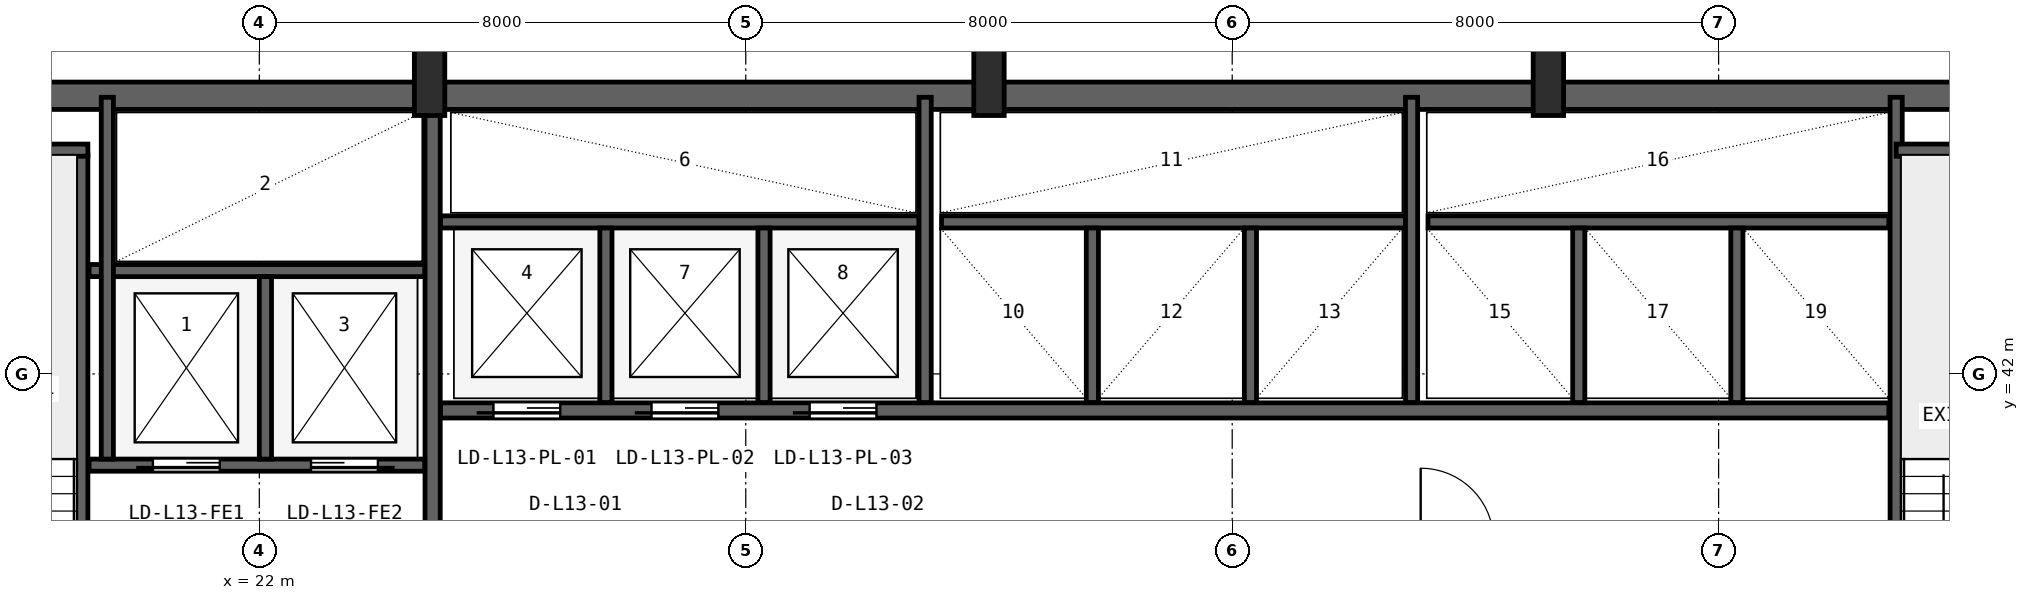
"""IFC4 building model, lengths in metres.
Left out: names, types, materials, properties, quantities, classifications, styles, units other than length and angle.
Written with IfcOpenShell. Run it as: python <this file> out.ifc"""

import sys

from ifc_helpers import new_model, si_unit, direction, frame, frame_2d, origin, origin_2d, place, context, subcontext, project, spatial, rectangle, i_section, extrude, source, transform, mapped, element, fill, save


model = new_model("IFC4")
c1 = context("Model", 3, precision=1e-05, world=origin(), true_north=direction((0.0, 1.0)))
c2 = subcontext(c1, "Body", "Model", "MODEL_VIEW")
j1 = project(units=[si_unit("LENGTHUNIT", "METRE"), si_unit("PLANEANGLEUNIT", "RADIAN")], contexts=[c1])
p1 = place(None, origin())
s1 = spatial("IfcSite", under=j1, at=p1, CompositionType="ELEMENT")
p2 = place(p1, origin())
s2 = spatial("IfcBuilding", under=s1, at=p2, CompositionType="ELEMENT")
p3 = place(p2, frame((0.0, 0.0, 58.8)))
s3 = spatial("IfcBuildingStorey", under=s2, at=p3, CompositionType="ELEMENT", Elevation=58.8)
p4 = place(p3, frame((15.6, 46.575, 0.0), z_axis=(0.0, 0.0, 1.0), x_axis=(1.0, 0.0, 0.0)))
e1 = element("IfcWall", 1, at=p4, inside=s3, PredefinedType="SHEAR", context=c2, shape_type="SweptSolid", body=[
    extrude(rectangle(XDim=36.8, YDim=0.45, at=frame_2d((18.4, 0.0))), origin(), (0.0, 0.0, 1.0), 3.65),
])
m1 = source(origin(), c2, "Body", "SweptSolid", [
    extrude(i_section(OverallWidth=0.5, OverallDepth=1.1, WebThickness=0.018, FlangeThickness=0.032, FilletRadius=0.018, at=origin_2d()), origin(), (0.0, 0.0, 1.0), 3.9),
])
for number, where, z_axis, x_axis in (
    (2, (24.8, 46.8, 0.0), (0.0, 0.0, 1.0), (1.0, 0.0, 0.0)),
    (3, (34.0, 46.8, 0.0), (0.0, 0.0, 1.0), (1.0, 0.0, 0.0)),
    (4, (43.2, 46.8, 0.0), (0.0, 0.0, 1.0), (1.0, 0.0, 0.0)),
):
    element("IfcColumn", number, at=place(p3, frame(where, z_axis=z_axis, x_axis=x_axis)), inside=s3, PredefinedType="COLUMN", context=c2, shape_type="MappedRepresentation", body=[
        mapped(m1, transform((0.0, 0.0, 0.0), x_axis=(1.0, 0.0, 0.0), y_axis=(0.0, 1.0, 0.0), z_axis=(0.0, 0.0, 1.0), scale=1.0)),
    ])
p5 = place(p3, frame((19.08, 35.95, 0.0), z_axis=(0.0, 0.0, 1.0), x_axis=(0.0, 1.0, 0.0)))
e5 = element("IfcWall", 5, at=p5, inside=s3, PredefinedType="SHEAR", context=c2, shape_type="SweptSolid", body=[
    extrude(rectangle(XDim=9.65, YDim=0.2, at=frame_2d((4.825, 0.0))), origin(), (0.0, 0.0, 1.0), 3.65),
])
p6 = place(p5, frame((0.25, 0.0, 0.0)))
e6 = element("IfcOpeningElement", 6, at=p6, cuts=e5, PredefinedType="OPENING", context=c2, shape_type="SweptSolid", body=[
    extrude(rectangle(XDim=0.95, YDim=2.1, at=frame_2d((0.475, 1.05))), frame((0.0, 0.11, 0.0), z_axis=(0.0, -1.0, 0.0), x_axis=(1.0, 0.0, 0.0)), (0.0, 0.0, 1.0), 0.22),
])
p7 = place(p3, frame((15.95, 45.68, 0.0), z_axis=(0.0, 0.0, 1.0), x_axis=(1.0, 0.0, 0.0)))
e7 = element("IfcWall", 7, at=p7, inside=s3, PredefinedType="SHEAR", context=c2, shape_type="SweptSolid", body=[
    extrude(rectangle(XDim=3.23, YDim=0.2, at=frame_2d((1.615, 0.0))), origin(), (0.0, 0.0, 1.0), 3.65),
])
p8 = place(p3, frame((24.85, 36.05, 0.0), z_axis=(0.0, 0.0, 1.0), x_axis=(0.0, 1.0, 0.0)))
e8 = element("IfcWall", 8, at=p8, inside=s3, PredefinedType="SHEAR", context=c2, shape_type="SweptSolid", body=[
    extrude(rectangle(XDim=10.45, YDim=0.25, at=frame_2d((5.225, 0.0))), origin(), (0.0, 0.0, 1.0), 3.65),
])
p9 = place(p3, frame((19.2, 40.5, 0.0), z_axis=(0.0, 0.0, 1.0), x_axis=(1.0, 0.0, 0.0)))
e9 = element("IfcWall", 9, at=p9, inside=s3, PredefinedType="SHEAR", context=c2, shape_type="SweptSolid", body=[
    extrude(rectangle(XDim=5.52, YDim=0.2, at=frame_2d((2.76, 0.0))), origin(), (0.0, 0.0, 1.0), 3.65),
])
p10 = place(p9, frame((1.05, 0.0, 0.0)))
e10 = element("IfcOpeningElement", 10, at=p10, cuts=e9, PredefinedType="OPENING", context=c2, shape_type="SweptSolid", body=[
    extrude(rectangle(XDim=1.1, YDim=2.18, at=frame_2d((0.55, 1.09))), frame((0.0, 0.11, 0.0), z_axis=(0.0, -1.0, 0.0), x_axis=(1.0, 0.0, 0.0)), (0.0, 0.0, 1.0), 0.22),
])
p11 = place(p9, frame((3.65, 0.0, 0.0)))
e11 = element("IfcOpeningElement", 11, at=p11, cuts=e9, PredefinedType="OPENING", context=c2, shape_type="SweptSolid", body=[
    extrude(rectangle(XDim=1.1, YDim=2.18, at=frame_2d((0.55, 1.09))), frame((0.0, 0.11, 0.0), z_axis=(0.0, -1.0, 0.0), x_axis=(1.0, 0.0, 0.0)), (0.0, 0.0, 1.0), 0.22),
])
p12 = place(p3, frame((19.2, 43.7, 0.0), z_axis=(0.0, 0.0, 1.0), x_axis=(1.0, 0.0, 0.0)))
e12 = element("IfcWall", 12, at=p12, inside=s3, PredefinedType="SHEAR", context=c2, shape_type="SweptSolid", body=[
    extrude(rectangle(XDim=5.52, YDim=0.2, at=frame_2d((2.76, 0.0))), origin(), (0.0, 0.0, 1.0), 3.65),
])
p13 = place(p3, frame((22.1, 40.6, 0.0), z_axis=(0.0, 0.0, 1.0), x_axis=(0.0, 1.0, 0.0)))
e13 = element("IfcWall", 13, at=p13, inside=s3, PredefinedType="SHEAR", context=c2, shape_type="SweptSolid", body=[
    extrude(rectangle(XDim=3.0, YDim=0.2, at=frame_2d((1.5, 0.0))), origin(), (0.0, 0.0, 1.0), 3.65),
])
p14 = place(p3, frame((19.5, 40.6, 0.0), z_axis=(0.0, 0.0, 1.0), x_axis=(0.0, 1.0, 0.0)))
e14 = element("IfcWall", 14, at=p14, inside=s3, PredefinedType="SHEAR", context=c2, shape_type="SweptSolid", body=[
    extrude(rectangle(XDim=5.95, YDim=0.2, at=frame_2d((2.975, 0.0))), origin(), (0.0, 0.0, 1.0), 3.65),
])
p15 = place(p3, frame((48.92, 36.05, 0.0), z_axis=(0.0, 0.0, 1.0), x_axis=(0.0, 1.0, 0.0)))
e15 = element("IfcWall", 15, at=p15, inside=s3, PredefinedType="SHEAR", context=c2, shape_type="SweptSolid", body=[
    extrude(rectangle(XDim=10.5, YDim=0.2, at=frame_2d((5.25, 0.0))), origin(), (0.0, 0.0, 1.0), 3.65),
])
p16 = place(p3, frame((48.92, 45.68, 0.0), z_axis=(0.0, 0.0, 1.0), x_axis=(1.0, 0.0, 0.0)))
e16 = element("IfcWall", 16, at=p16, inside=s3, PredefinedType="SHEAR", context=c2, shape_type="SweptSolid", body=[
    extrude(rectangle(XDim=3.18, YDim=0.2, at=frame_2d((1.59, 0.0))), origin(), (0.0, 0.0, 1.0), 3.65),
])
p17 = place(p3, frame((24.98, 41.4, 0.0), z_axis=(0.0, 0.0, 1.0), x_axis=(1.0, 0.0, 0.0)))
e17 = element("IfcWall", 17, at=p17, inside=s3, PredefinedType="SHEAR", context=c2, shape_type="SweptSolid", body=[
    extrude(rectangle(XDim=23.82, YDim=0.25, at=frame_2d((11.91, 0.0))), origin(), (0.0, 0.0, 1.0), 3.65),
])
p18 = place(p17, frame((0.87, 0.0, 0.0)))
e18 = element("IfcOpeningElement", 18, at=p18, cuts=e17, PredefinedType="OPENING", context=c2, shape_type="SweptSolid", body=[
    extrude(rectangle(XDim=1.1, YDim=2.18, at=frame_2d((0.55, 1.09))), frame((0.0, 0.135, 0.0), z_axis=(0.0, -1.0, 0.0), x_axis=(1.0, 0.0, 0.0)), (0.0, 0.0, 1.0), 0.27),
])
p19 = place(p17, frame((3.47, 0.0, 0.0)))
e19 = element("IfcOpeningElement", 19, at=p19, cuts=e17, PredefinedType="OPENING", context=c2, shape_type="SweptSolid", body=[
    extrude(rectangle(XDim=1.1, YDim=2.18, at=frame_2d((0.55, 1.09))), frame((0.0, 0.135, 0.0), z_axis=(0.0, -1.0, 0.0), x_axis=(1.0, 0.0, 0.0)), (0.0, 0.0, 1.0), 0.27),
])
p20 = place(p17, frame((6.07, 0.0, 0.0)))
e20 = element("IfcOpeningElement", 20, at=p20, cuts=e17, PredefinedType="OPENING", context=c2, shape_type="SweptSolid", body=[
    extrude(rectangle(XDim=1.1, YDim=2.18, at=frame_2d((0.55, 1.09))), frame((0.0, 0.135, 0.0), z_axis=(0.0, -1.0, 0.0), x_axis=(1.0, 0.0, 0.0)), (0.0, 0.0, 1.0), 0.27),
])
p21 = place(p3, frame((24.98, 44.5, 0.0), z_axis=(0.0, 0.0, 1.0), x_axis=(1.0, 0.0, 0.0)))
e21 = element("IfcWall", 21, at=p21, inside=s3, PredefinedType="SHEAR", context=c2, shape_type="SweptSolid", body=[
    extrude(rectangle(XDim=7.87, YDim=0.2, at=frame_2d((3.935, 0.0))), origin(), (0.0, 0.0, 1.0), 3.65),
])
for number, where, z_axis, x_axis in (
    (22, (27.7, 41.53, 0.0), (0.0, 0.0, 1.0), (0.0, 1.0, 0.0)),
    (23, (30.3, 41.53, 0.0), (0.0, 0.0, 1.0), (0.0, 1.0, 0.0)),
):
    element("IfcWall", number, at=place(p3, frame(where, z_axis=z_axis, x_axis=x_axis)), inside=s3, PredefinedType="SHEAR", context=c2, shape_type="SweptSolid", body=[
        extrude(rectangle(XDim=2.87, YDim=0.2, at=frame_2d((1.435, 0.0))), origin(), (0.0, 0.0, 1.0), 3.65),
    ])
p22 = place(p3, frame((32.95, 41.53, 0.0), z_axis=(0.0, 0.0, 1.0), x_axis=(0.0, 1.0, 0.0)))
e24 = element("IfcWall", 24, at=p22, inside=s3, PredefinedType="SHEAR", context=c2, shape_type="SweptSolid", body=[
    extrude(rectangle(XDim=5.02, YDim=0.2, at=frame_2d((2.51, 0.0))), origin(), (0.0, 0.0, 1.0), 3.65),
])
p23 = place(p3, frame((33.22, 44.5, 0.0), z_axis=(0.0, 0.0, 1.0), x_axis=(1.0, 0.0, 0.0)))
e25 = element("IfcWall", 25, at=p23, inside=s3, PredefinedType="SHEAR", context=c2, shape_type="SweptSolid", body=[
    extrude(rectangle(XDim=7.63, YDim=0.2, at=frame_2d((3.815, 0.0))), origin(), (0.0, 0.0, 1.0), 3.65),
])
for number, where, z_axis, x_axis in (
    (26, (35.7, 41.53, 0.0), (0.0, 0.0, 1.0), (0.0, 1.0, 0.0)),
    (27, (38.3, 41.53, 0.0), (0.0, 0.0, 1.0), (0.0, 1.0, 0.0)),
):
    element("IfcWall", number, at=place(p3, frame(where, z_axis=z_axis, x_axis=x_axis)), inside=s3, PredefinedType="SHEAR", context=c2, shape_type="SweptSolid", body=[
        extrude(rectangle(XDim=2.87, YDim=0.2, at=frame_2d((1.435, 0.0))), origin(), (0.0, 0.0, 1.0), 3.65),
    ])
p24 = place(p3, frame((40.95, 41.53, 0.0), z_axis=(0.0, 0.0, 1.0), x_axis=(0.0, 1.0, 0.0)))
e28 = element("IfcWall", 28, at=p24, inside=s3, PredefinedType="SHEAR", context=c2, shape_type="SweptSolid", body=[
    extrude(rectangle(XDim=5.02, YDim=0.2, at=frame_2d((2.51, 0.0))), origin(), (0.0, 0.0, 1.0), 3.65),
])
p25 = place(p3, frame((41.22, 44.5, 0.0), z_axis=(0.0, 0.0, 1.0), x_axis=(1.0, 0.0, 0.0)))
e29 = element("IfcWall", 29, at=p25, inside=s3, PredefinedType="SHEAR", context=c2, shape_type="SweptSolid", body=[
    extrude(rectangle(XDim=7.58, YDim=0.2, at=frame_2d((3.79, 0.0))), origin(), (0.0, 0.0, 1.0), 3.65),
])
for number, where, z_axis, x_axis in (
    (30, (43.7, 41.53, 0.0), (0.0, 0.0, 1.0), (0.0, 1.0, 0.0)),
    (31, (46.3, 41.53, 0.0), (0.0, 0.0, 1.0), (0.0, 1.0, 0.0)),
):
    element("IfcWall", number, at=place(p3, frame(where, z_axis=z_axis, x_axis=x_axis)), inside=s3, PredefinedType="SHEAR", context=c2, shape_type="SweptSolid", body=[
        extrude(rectangle(XDim=2.87, YDim=0.2, at=frame_2d((1.435, 0.0))), origin(), (0.0, 0.0, 1.0), 3.65),
    ])
m2 = source(origin(), c2, "Body", "SweptSolid", [
    extrude(rectangle(XDim=1.1, YDim=2.18, at=frame_2d((0.55, 1.09))), frame((0.0, 0.025, 0.0), z_axis=(0.0, -1.0, 0.0), x_axis=(1.0, 0.0, 0.0)), (0.0, 0.0, 1.0), 0.05),
])
p26 = place(p10, frame((1.1, 0.0, 0.0), z_axis=(0.0, 0.0, 1.0), x_axis=(-1.0, 0.0, 0.0)))
e32 = element("IfcDoor", 32, at=p26, inside=s3, OperationType="SLIDING_TO_LEFT", PredefinedType="DOOR", context=c2, shape_type="MappedRepresentation", body=[
    mapped(m2, transform((0.0, 0.0, 0.0), x_axis=(1.0, 0.0, 0.0), y_axis=(0.0, 1.0, 0.0), z_axis=(0.0, 0.0, 1.0), scale=1.0)),
])
fill(e10, e32)
p27 = place(p11, frame((1.1, 0.0, 0.0), z_axis=(0.0, 0.0, 1.0), x_axis=(-1.0, 0.0, 0.0)))
e33 = element("IfcDoor", 33, at=p27, inside=s3, OperationType="SLIDING_TO_RIGHT", PredefinedType="DOOR", context=c2, shape_type="MappedRepresentation", body=[
    mapped(m2, transform((0.0, 0.0, 0.0), x_axis=(1.0, 0.0, 0.0), y_axis=(0.0, 1.0, 0.0), z_axis=(0.0, 0.0, 1.0), scale=1.0)),
])
fill(e11, e33)
p28 = place(p18, frame((1.1, 0.0, 0.0), z_axis=(0.0, 0.0, 1.0), x_axis=(-1.0, 0.0, 0.0)))
e34 = element("IfcDoor", 34, at=p28, inside=s3, OperationType="SLIDING_TO_LEFT", PredefinedType="DOOR", context=c2, shape_type="MappedRepresentation", body=[
    mapped(m2, transform((0.0, 0.0, 0.0), x_axis=(1.0, 0.0, 0.0), y_axis=(0.0, 1.0, 0.0), z_axis=(0.0, 0.0, 1.0), scale=1.0)),
])
fill(e18, e34)
p29 = place(p19, frame((1.1, 0.0, 0.0), z_axis=(0.0, 0.0, 1.0), x_axis=(-1.0, 0.0, 0.0)))
e35 = element("IfcDoor", 35, at=p29, inside=s3, OperationType="SLIDING_TO_LEFT", PredefinedType="DOOR", context=c2, shape_type="MappedRepresentation", body=[
    mapped(m2, transform((0.0, 0.0, 0.0), x_axis=(1.0, 0.0, 0.0), y_axis=(0.0, 1.0, 0.0), z_axis=(0.0, 0.0, 1.0), scale=1.0)),
])
fill(e19, e35)
p30 = place(p20, frame((1.1, 0.0, 0.0), z_axis=(0.0, 0.0, 1.0), x_axis=(-1.0, 0.0, 0.0)))
e36 = element("IfcDoor", 36, at=p30, inside=s3, OperationType="SLIDING_TO_LEFT", PredefinedType="DOOR", context=c2, shape_type="MappedRepresentation", body=[
    mapped(m2, transform((0.0, 0.0, 0.0), x_axis=(1.0, 0.0, 0.0), y_axis=(0.0, 1.0, 0.0), z_axis=(0.0, 0.0, 1.0), scale=1.0)),
])
fill(e20, e36)
save(model, sys.argv[1])
